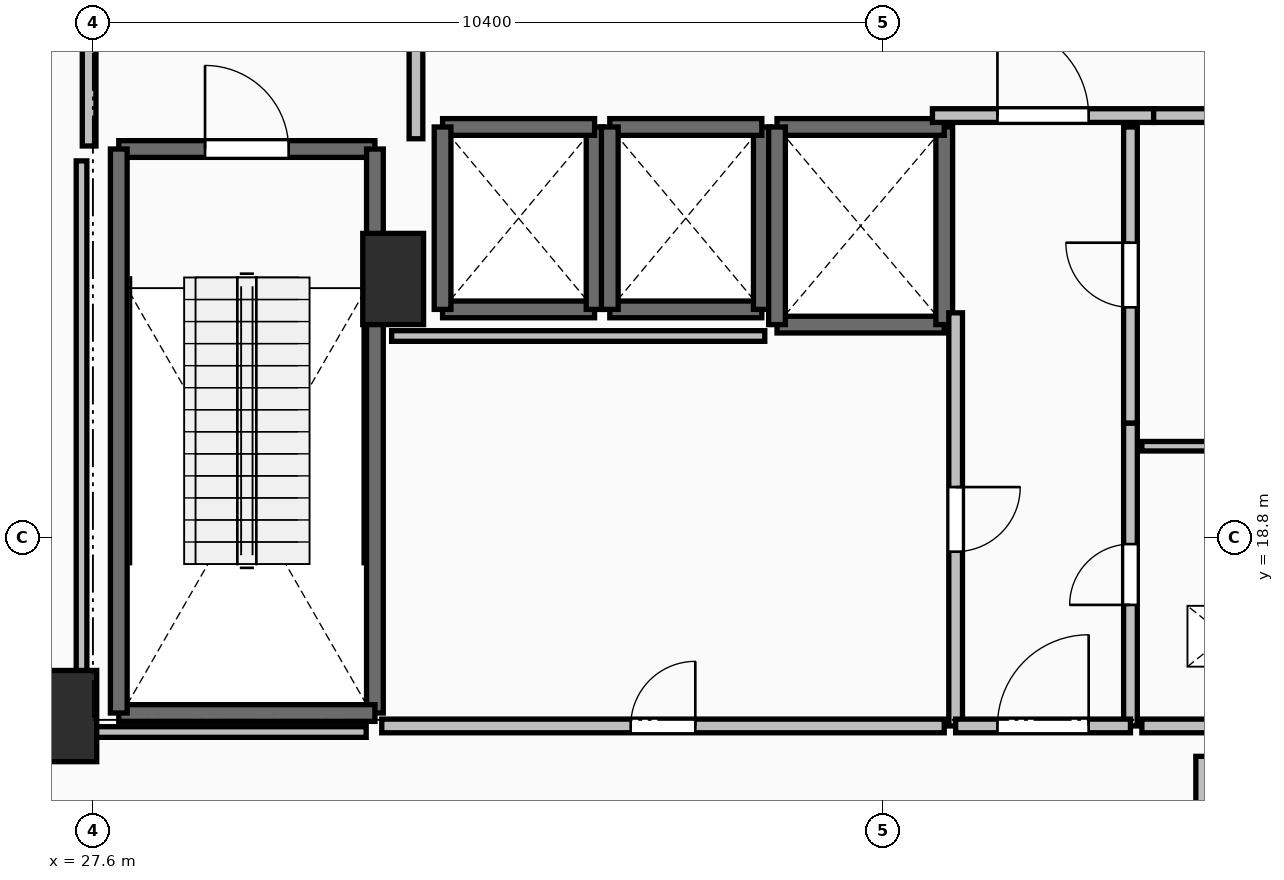
"""IFC4 building model, lengths in metres.
Left out: names, types, materials, properties, quantities, classifications, styles, units other than length and angle.
Written with IfcOpenShell. Run it as: python <this file> out.ifc"""

import sys

from ifc_helpers import new_model, si_unit, direction, frame, frame_2d, origin, origin_2d, place, context, subcontext, project, spatial, rectangle, extrude, element, fill, save


model = new_model("IFC4")
c1 = context("Model", 3, precision=1e-05, world=origin(), true_north=direction((0.0, 1.0)))
c2 = subcontext(c1, "Body", "Model", "MODEL_VIEW")
j1 = project(units=[si_unit("LENGTHUNIT", "METRE"), si_unit("PLANEANGLEUNIT", "RADIAN")], contexts=[c1])
p1 = place(None, origin())
s1 = spatial("IfcSite", under=j1, at=p1, CompositionType="ELEMENT")
p2 = place(p1, origin())
s2 = spatial("IfcBuilding", under=s1, at=p2, CompositionType="ELEMENT")
p3 = place(p2, frame((0.0, 0.0, 4.8)))
s3 = spatial("IfcBuildingStorey", under=s2, at=p3, CompositionType="ELEMENT", Elevation=4.8)
for number, where, z_axis, x_axis in (
    (1, (27.25, 16.45, 0.0), (0.0, 0.0, 1.0), (1.0, 0.0, 0.0)),
    (2, (31.55, 22.2, 0.0), (0.0, 0.0, 1.0), (1.0, 0.0, 0.0)),
):
    element("IfcColumn", number, at=place(p3, frame(where, z_axis=z_axis, x_axis=x_axis)), inside=s3, PredefinedType="PILASTER", context=c2, shape_type="SweptSolid", body=[
        extrude(rectangle(XDim=0.8, YDim=1.2, at=origin_2d()), origin(), (0.0, 0.0, 1.0), 4.8),
    ])
p4 = place(p3, frame((27.94, 23.91, 0.0), z_axis=(0.0, 0.0, 1.0), x_axis=(1.0, 0.0, 0.0)))
e3 = element("IfcWall", 3, at=p4, inside=s3, PredefinedType="SOLIDWALL", context=c2, shape_type="SweptSolid", body=[
    extrude(rectangle(XDim=3.37, YDim=0.22, at=frame_2d((1.685, 0.0))), origin(), (0.0, 0.0, 1.0), 4.48),
])
p5 = place(p4, frame((1.135, 0.0, 0.0)))
e4 = element("IfcOpeningElement", 4, at=p5, cuts=e3, PredefinedType="OPENING", context=c2, shape_type="SweptSolid", body=[
    extrude(rectangle(XDim=1.1, YDim=2.15, at=frame_2d((0.55, 1.075))), frame((0.0, 0.125, 0.0), z_axis=(0.0, -1.0, 0.0), x_axis=(1.0, 0.0, 0.0)), (0.0, 0.0, 1.0), 0.25),
])
p6 = place(p3, frame((31.31, 23.91, 0.0), z_axis=(0.0, 0.0, 1.0), x_axis=(0.0, -1.0, 0.0)))
e5 = element("IfcWall", 5, at=p6, inside=s3, PredefinedType="SOLIDWALL", context=c2, shape_type="SweptSolid", body=[
    extrude(rectangle(XDim=7.42, YDim=0.22, at=frame_2d((3.71, 0.0))), origin(), (0.0, 0.0, 1.0), 4.48),
])
p7 = place(p3, frame((31.31, 16.49, 0.0), z_axis=(0.0, 0.0, 1.0), x_axis=(-1.0, 0.0, 0.0)))
e6 = element("IfcWall", 6, at=p7, inside=s3, PredefinedType="SOLIDWALL", context=c2, shape_type="SweptSolid", body=[
    extrude(rectangle(XDim=3.37, YDim=0.22, at=frame_2d((1.685, 0.0))), origin(), (0.0, 0.0, 1.0), 4.48),
])
p8 = place(p3, frame((27.94, 16.49, 0.0), z_axis=(0.0, 0.0, 1.0), x_axis=(0.0, 1.0, 0.0)))
e7 = element("IfcWall", 7, at=p8, inside=s3, PredefinedType="SOLIDWALL", context=c2, shape_type="SweptSolid", body=[
    extrude(rectangle(XDim=7.42, YDim=0.22, at=frame_2d((3.71, 0.0))), origin(), (0.0, 0.0, 1.0), 4.48),
])
p9 = place(p3, frame((32.2, 21.8, 0.0), z_axis=(0.0, 0.0, 1.0), x_axis=(1.0, 0.0, 0.0)))
e8 = element("IfcWall", 8, at=p9, inside=s3, PredefinedType="SOLIDWALL", context=c2, shape_type="SweptSolid", body=[
    extrude(rectangle(XDim=2.0, YDim=0.22, at=frame_2d((1.0, 0.0))), origin(), (0.0, 0.0, 1.0), 4.48),
])
p10 = place(p3, frame((34.2, 21.8, 0.0), z_axis=(0.0, 0.0, 1.0), x_axis=(0.0, 1.0, 0.0)))
e9 = element("IfcWall", 9, at=p10, inside=s3, PredefinedType="SOLIDWALL", context=c2, shape_type="SweptSolid", body=[
    extrude(rectangle(XDim=2.4, YDim=0.22, at=frame_2d((1.2, 0.0))), origin(), (0.0, 0.0, 1.0), 4.48),
])
p11 = place(p3, frame((34.2, 24.2, 0.0), z_axis=(0.0, 0.0, 1.0), x_axis=(-1.0, 0.0, 0.0)))
e10 = element("IfcWall", 10, at=p11, inside=s3, PredefinedType="SOLIDWALL", context=c2, shape_type="SweptSolid", body=[
    extrude(rectangle(XDim=2.0, YDim=0.22, at=frame_2d((1.0, 0.0))), origin(), (0.0, 0.0, 1.0), 4.48),
])
p12 = place(p3, frame((32.2, 24.2, 0.0), z_axis=(0.0, 0.0, 1.0), x_axis=(0.0, -1.0, 0.0)))
e11 = element("IfcWall", 11, at=p12, inside=s3, PredefinedType="SOLIDWALL", context=c2, shape_type="SweptSolid", body=[
    extrude(rectangle(XDim=2.4, YDim=0.22, at=frame_2d((1.2, 0.0))), origin(), (0.0, 0.0, 1.0), 4.48),
])
p13 = place(p3, frame((34.4, 21.8, 0.0), z_axis=(0.0, 0.0, 1.0), x_axis=(1.0, 0.0, 0.0)))
e12 = element("IfcWall", 12, at=p13, inside=s3, PredefinedType="SOLIDWALL", context=c2, shape_type="SweptSolid", body=[
    extrude(rectangle(XDim=2.0, YDim=0.22, at=frame_2d((1.0, 0.0))), origin(), (0.0, 0.0, 1.0), 4.48),
])
p14 = place(p3, frame((36.4, 21.8, 0.0), z_axis=(0.0, 0.0, 1.0), x_axis=(0.0, 1.0, 0.0)))
e13 = element("IfcWall", 13, at=p14, inside=s3, PredefinedType="SOLIDWALL", context=c2, shape_type="SweptSolid", body=[
    extrude(rectangle(XDim=2.4, YDim=0.22, at=frame_2d((1.2, 0.0))), origin(), (0.0, 0.0, 1.0), 4.48),
])
p15 = place(p3, frame((36.4, 24.2, 0.0), z_axis=(0.0, 0.0, 1.0), x_axis=(-1.0, 0.0, 0.0)))
e14 = element("IfcWall", 14, at=p15, inside=s3, PredefinedType="SOLIDWALL", context=c2, shape_type="SweptSolid", body=[
    extrude(rectangle(XDim=2.0, YDim=0.22, at=frame_2d((1.0, 0.0))), origin(), (0.0, 0.0, 1.0), 4.48),
])
p16 = place(p3, frame((34.4, 24.2, 0.0), z_axis=(0.0, 0.0, 1.0), x_axis=(0.0, -1.0, 0.0)))
e15 = element("IfcWall", 15, at=p16, inside=s3, PredefinedType="SOLIDWALL", context=c2, shape_type="SweptSolid", body=[
    extrude(rectangle(XDim=2.4, YDim=0.22, at=frame_2d((1.2, 0.0))), origin(), (0.0, 0.0, 1.0), 4.48),
])
p17 = place(p3, frame((36.6, 21.6, 0.0), z_axis=(0.0, 0.0, 1.0), x_axis=(1.0, 0.0, 0.0)))
e16 = element("IfcWall", 16, at=p17, inside=s3, PredefinedType="SOLIDWALL", context=c2, shape_type="SweptSolid", body=[
    extrude(rectangle(XDim=2.2, YDim=0.22, at=frame_2d((1.1, 0.0))), origin(), (0.0, 0.0, 1.0), 4.48),
])
p18 = place(p3, frame((38.8, 21.6, 0.0), z_axis=(0.0, 0.0, 1.0), x_axis=(0.0, 1.0, 0.0)))
e17 = element("IfcWall", 17, at=p18, inside=s3, PredefinedType="SOLIDWALL", context=c2, shape_type="SweptSolid", body=[
    extrude(rectangle(XDim=2.6, YDim=0.22, at=frame_2d((1.3, 0.0))), origin(), (0.0, 0.0, 1.0), 4.48),
])
p19 = place(p3, frame((38.8, 24.2, 0.0), z_axis=(0.0, 0.0, 1.0), x_axis=(-1.0, 0.0, 0.0)))
e18 = element("IfcWall", 18, at=p19, inside=s3, PredefinedType="SOLIDWALL", context=c2, shape_type="SweptSolid", body=[
    extrude(rectangle(XDim=2.2, YDim=0.22, at=frame_2d((1.1, 0.0))), origin(), (0.0, 0.0, 1.0), 4.48),
])
p20 = place(p3, frame((36.6, 24.2, 0.0), z_axis=(0.0, 0.0, 1.0), x_axis=(0.0, -1.0, 0.0)))
e19 = element("IfcWall", 19, at=p20, inside=s3, PredefinedType="SOLIDWALL", context=c2, shape_type="SweptSolid", body=[
    extrude(rectangle(XDim=2.6, YDim=0.22, at=frame_2d((1.3, 0.0))), origin(), (0.0, 0.0, 1.0), 4.48),
])
p21 = place(p3, frame((31.85, 24.045, 0.0), z_axis=(0.0, 0.0, 1.0), x_axis=(0.0, 1.0, 0.0)))
e20 = element("IfcWall", 20, at=p21, inside=s3, PredefinedType="PARTITIONING", context=c2, shape_type="SweptSolid", body=[
    extrude(rectangle(XDim=3.91, YDim=0.18, at=frame_2d((1.955, 0.0))), origin(), (0.0, 0.0, 1.0), 4.48),
])
p22 = place(p21, frame((1.355, 0.0, 0.0)))
e21 = element("IfcOpeningElement", 21, at=p22, cuts=e20, PredefinedType="OPENING", context=c2, shape_type="SweptSolid", body=[
    extrude(rectangle(XDim=1.2, YDim=2.15, at=frame_2d((0.6, 1.075))), frame((0.0, 0.105, 0.0), z_axis=(0.0, -1.0, 0.0), x_axis=(1.0, 0.0, 0.0)), (0.0, 0.0, 1.0), 0.21),
])
p23 = place(p3, frame((27.55, 28.0, 0.0), z_axis=(0.0, 0.0, 1.0), x_axis=(0.0, -1.0, 0.0)))
e22 = element("IfcWall", 22, at=p23, inside=s3, PredefinedType="PARTITIONING", context=c2, shape_type="SweptSolid", body=[
    extrude(rectangle(XDim=4.05, YDim=0.18, at=frame_2d((2.025, 0.0))), origin(), (0.0, 0.0, 1.0), 4.48),
])
p24 = place(p23, frame((1.425, 0.0, 0.0)))
e23 = element("IfcOpeningElement", 23, at=p24, cuts=e22, PredefinedType="OPENING", context=c2, shape_type="SweptSolid", body=[
    extrude(rectangle(XDim=1.2, YDim=2.15, at=frame_2d((0.6, 1.075))), frame((0.0, 0.105, 0.0), z_axis=(0.0, -1.0, 0.0), x_axis=(1.0, 0.0, 0.0)), (0.0, 0.0, 1.0), 0.21),
])
p25 = place(p3, frame((38.645, 24.35, 0.0), z_axis=(0.0, 0.0, 1.0), x_axis=(1.0, 0.0, 0.0)))
e24 = element("IfcWall", 24, at=p25, inside=s3, PredefinedType="PARTITIONING", context=c2, shape_type="SweptSolid", body=[
    extrude(rectangle(XDim=2.91, YDim=0.18, at=frame_2d((1.455, 0.0))), origin(), (0.0, 0.0, 1.0), 4.48),
])
p26 = place(p25, frame((0.855, 0.0, 0.0)))
e25 = element("IfcOpeningElement", 25, at=p26, cuts=e24, PredefinedType="OPENING", context=c2, shape_type="SweptSolid", body=[
    extrude(rectangle(XDim=1.2, YDim=2.15, at=frame_2d((0.6, 1.075))), frame((0.0, 0.105, 0.0), z_axis=(0.0, -1.0, 0.0), x_axis=(1.0, 0.0, 0.0)), (0.0, 0.0, 1.0), 0.21),
])
p27 = place(p3, frame((41.555, 24.35, 0.0), z_axis=(0.0, 0.0, 1.0), x_axis=(1.0, 0.0, 0.0)))
e26 = element("IfcWall", 26, at=p27, inside=s3, PredefinedType="PARTITIONING", context=c2, shape_type="SweptSolid", body=[
    extrude(rectangle(XDim=2.445, YDim=0.18, at=frame_2d((1.223, 0.0))), origin(), (0.0, 0.0, 1.0), 4.48),
])
p28 = place(p27, frame((0.798, 0.0, 0.0)))
e27 = element("IfcOpeningElement", 27, at=p28, cuts=e26, PredefinedType="OPENING", context=c2, shape_type="SweptSolid", body=[
    extrude(rectangle(XDim=0.85, YDim=2.1, at=frame_2d((0.425, 1.05))), frame((0.0, 0.105, 0.0), z_axis=(0.0, -1.0, 0.0), x_axis=(1.0, 0.0, 0.0)), (0.0, 0.0, 1.0), 0.21),
])
p29 = place(p3, frame((41.25, 16.32, 0.0), z_axis=(0.0, 0.0, 1.0), x_axis=(0.0, 1.0, 0.0)))
e28 = element("IfcWall", 28, at=p29, inside=s3, PredefinedType="PARTITIONING", context=c2, shape_type="SweptSolid", body=[
    extrude(rectangle(XDim=3.985, YDim=0.18, at=frame_2d((1.992, 0.0))), origin(), (0.0, 0.0, 1.0), 4.48),
])
p30 = place(p29, frame((1.593, 0.0, 0.0)))
e29 = element("IfcOpeningElement", 29, at=p30, cuts=e28, PredefinedType="OPENING", context=c2, shape_type="SweptSolid", body=[
    extrude(rectangle(XDim=0.8, YDim=2.05, at=frame_2d((0.4, 1.025))), frame((0.0, 0.105, 0.0), z_axis=(0.0, -1.0, 0.0), x_axis=(1.0, 0.0, 0.0)), (0.0, 0.0, 1.0), 0.21),
])
p31 = place(p3, frame((41.25, 20.305, 0.0), z_axis=(0.0, 0.0, 1.0), x_axis=(0.0, 1.0, 0.0)))
e30 = element("IfcWall", 30, at=p31, inside=s3, PredefinedType="PARTITIONING", context=c2, shape_type="SweptSolid", body=[
    extrude(rectangle(XDim=3.895, YDim=0.18, at=frame_2d((1.948, 0.0))), origin(), (0.0, 0.0, 1.0), 4.48),
])
p32 = place(p31, frame((1.522, 0.0, 0.0)))
e31 = element("IfcOpeningElement", 31, at=p32, cuts=e30, PredefinedType="OPENING", context=c2, shape_type="SweptSolid", body=[
    extrude(rectangle(XDim=0.85, YDim=2.1, at=frame_2d((0.425, 1.05))), frame((0.0, 0.105, 0.0), z_axis=(0.0, -1.0, 0.0), x_axis=(1.0, 0.0, 0.0)), (0.0, 0.0, 1.0), 0.21),
])
p33 = place(p3, frame((38.95, 21.755, 0.0), z_axis=(0.0, 0.0, 1.0), x_axis=(0.0, -1.0, 0.0)))
e32 = element("IfcWall", 32, at=p33, inside=s3, PredefinedType="PARTITIONING", context=c2, shape_type="SweptSolid", body=[
    extrude(rectangle(XDim=5.435, YDim=0.18, at=frame_2d((2.717, 0.0))), origin(), (0.0, 0.0, 1.0), 4.48),
])
p34 = place(p33, frame((2.292, 0.0, 0.0)))
e33 = element("IfcOpeningElement", 33, at=p34, cuts=e32, PredefinedType="OPENING", context=c2, shape_type="SweptSolid", body=[
    extrude(rectangle(XDim=0.85, YDim=2.1, at=frame_2d((0.425, 1.05))), frame((0.0, 0.105, 0.0), z_axis=(0.0, -1.0, 0.0), x_axis=(1.0, 0.0, 0.0)), (0.0, 0.0, 1.0), 0.21),
])
p35 = place(p3, frame((38.95, 16.32, 0.0), z_axis=(0.0, 0.0, 1.0), x_axis=(1.0, 0.0, 0.0)))
e34 = element("IfcWall", 34, at=p35, inside=s3, PredefinedType="PARTITIONING", context=c2, shape_type="SweptSolid", body=[
    extrude(rectangle(XDim=2.3, YDim=0.18, at=frame_2d((1.15, 0.0))), origin(), (0.0, 0.0, 1.0), 4.48),
])
p36 = place(p35, frame((0.55, 0.0, 0.0)))
e35 = element("IfcOpeningElement", 35, at=p36, cuts=e34, PredefinedType="OPENING", context=c2, shape_type="SweptSolid", body=[
    extrude(rectangle(XDim=1.2, YDim=2.15, at=frame_2d((0.6, 1.075))), frame((0.0, 0.105, 0.0), z_axis=(0.0, -1.0, 0.0), x_axis=(1.0, 0.0, 0.0)), (0.0, 0.0, 1.0), 0.21),
])
p37 = place(p3, frame((44.6, 20.0, 0.0), z_axis=(0.0, 0.0, 1.0), x_axis=(-1.0, 0.0, 0.0)))
e36 = element("IfcWall", 36, at=p37, inside=s3, PredefinedType="PARTITIONING", context=c2, shape_type="SweptSolid", body=[
    extrude(rectangle(XDim=3.2, YDim=0.125, at=frame_2d((1.6, 0.0))), origin(), (0.0, 0.0, 1.0), 4.48),
])
p38 = place(p3, frame((41.4, 16.32, 0.0), z_axis=(0.0, 0.0, 1.0), x_axis=(1.0, 0.0, 0.0)))
e37 = element("IfcWall", 37, at=p38, inside=s3, PredefinedType="PARTITIONING", context=c2, shape_type="SweptSolid", body=[
    extrude(rectangle(XDim=3.2, YDim=0.18, at=frame_2d((1.6, 0.0))), origin(), (0.0, 0.0, 1.0), 4.48),
])
p39 = place(p38, frame((1.2, 0.0, 0.0)))
e38 = element("IfcOpeningElement", 38, at=p39, cuts=e37, PredefinedType="OPENING", context=c2, shape_type="SweptSolid", body=[
    extrude(rectangle(XDim=0.8, YDim=2.05, at=frame_2d((0.4, 1.025))), frame((0.0, 0.105, 0.0), z_axis=(0.0, -1.0, 0.0), x_axis=(1.0, 0.0, 0.0)), (0.0, 0.0, 1.0), 0.21),
])
p40 = place(p3, frame((31.4, 16.32, 0.0), z_axis=(0.0, 0.0, 1.0), x_axis=(1.0, 0.0, 0.0)))
e39 = element("IfcWall", 39, at=p40, inside=s3, PredefinedType="PARTITIONING", context=c2, shape_type="SweptSolid", body=[
    extrude(rectangle(XDim=7.4, YDim=0.18, at=frame_2d((3.7, 0.0))), origin(), (0.0, 0.0, 1.0), 4.48),
])
p41 = place(p40, frame((3.275, 0.0, 0.0)))
e40 = element("IfcOpeningElement", 40, at=p41, cuts=e39, PredefinedType="OPENING", context=c2, shape_type="SweptSolid", body=[
    extrude(rectangle(XDim=0.85, YDim=2.1, at=frame_2d((0.425, 1.05))), frame((0.0, 0.105, 0.0), z_axis=(0.0, -1.0, 0.0), x_axis=(1.0, 0.0, 0.0)), (0.0, 0.0, 1.0), 0.21),
])
p42 = place(p3, frame((42.2, 14.1, 0.0), z_axis=(0.0, 0.0, 1.0), x_axis=(0.0, 1.0, 0.0)))
e41 = element("IfcWall", 41, at=p42, inside=s3, PredefinedType="PARTITIONING", context=c2, shape_type="SweptSolid", body=[
    extrude(rectangle(XDim=1.82, YDim=0.18, at=frame_2d((0.91, 0.0))), origin(), (0.0, 0.0, 1.0), 4.48),
])
p43 = place(p3, frame((36.439, 21.45, 0.0), z_axis=(0.0, 0.0, 1.0), x_axis=(-1.0, 0.0, 0.0)))
e42 = element("IfcWall", 42, at=p43, inside=s3, PredefinedType="PARTITIONING", context=c2, shape_type="SweptSolid", body=[
    extrude(rectangle(XDim=4.909, YDim=0.14, at=frame_2d((2.455, 0.0))), origin(), (0.0, 0.0, 1.0), 4.48),
])
p44 = place(p3, frame((31.195, 16.24, 0.0), z_axis=(0.0, 0.0, 1.0), x_axis=(-1.0, 0.0, 0.0)))
e43 = element("IfcWall", 43, at=p44, inside=s3, PredefinedType="PARTITIONING", context=c2, shape_type="SweptSolid", body=[
    extrude(rectangle(XDim=3.745, YDim=0.14, at=frame_2d((1.873, 0.0))), origin(), (0.0, 0.0, 1.0), 3.672),
])
p45 = place(p3, frame((27.45, 16.24, 0.0), z_axis=(0.0, 0.0, 1.0), x_axis=(0.0, 1.0, 0.0)))
e44 = element("IfcWall", 44, at=p45, inside=s3, PredefinedType="PARTITIONING", context=c2, shape_type="SweptSolid", body=[
    extrude(rectangle(XDim=7.514, YDim=0.14, at=frame_2d((3.757, 0.0))), origin(), (0.0, 0.0, 1.0), 2.406),
])
p46 = place(p5, origin())
e45 = element("IfcDoor", 45, at=p46, inside=s3, OperationType="SINGLE_SWING_LEFT", PredefinedType="DOOR", context=c2, shape_type="SweptSolid", body=[
    extrude(rectangle(XDim=1.1, YDim=2.15, at=frame_2d((0.55, 1.075))), frame((0.0, 0.025, 0.0), z_axis=(0.0, -1.0, 0.0), x_axis=(1.0, 0.0, 0.0)), (0.0, 0.0, 1.0), 0.05),
])
fill(e4, e45)
p47 = place(p26, origin())
e46 = element("IfcDoor", 46, at=p47, inside=s3, OperationType="SINGLE_SWING_LEFT", PredefinedType="DOOR", context=c2, shape_type="SweptSolid", body=[
    extrude(rectangle(XDim=1.2, YDim=2.15, at=frame_2d((0.6, 1.075))), frame((0.0, 0.025, 0.0), z_axis=(0.0, -1.0, 0.0), x_axis=(1.0, 0.0, 0.0)), (0.0, 0.0, 1.0), 0.05),
])
fill(e25, e46)
p48 = place(p30, origin())
e47 = element("IfcDoor", 47, at=p48, inside=s3, OperationType="SINGLE_SWING_LEFT", PredefinedType="DOOR", context=c2, shape_type="SweptSolid", body=[
    extrude(rectangle(XDim=0.8, YDim=2.05, at=frame_2d((0.4, 1.025))), frame((0.0, 0.025, 0.0), z_axis=(0.0, -1.0, 0.0), x_axis=(1.0, 0.0, 0.0)), (0.0, 0.0, 1.0), 0.05),
])
fill(e29, e47)
p49 = place(p32, origin())
e48 = element("IfcDoor", 48, at=p49, inside=s3, OperationType="SINGLE_SWING_RIGHT", PredefinedType="DOOR", context=c2, shape_type="SweptSolid", body=[
    extrude(rectangle(XDim=0.85, YDim=2.1, at=frame_2d((0.425, 1.05))), frame((0.0, 0.025, 0.0), z_axis=(0.0, -1.0, 0.0), x_axis=(1.0, 0.0, 0.0)), (0.0, 0.0, 1.0), 0.05),
])
fill(e31, e48)
p50 = place(p34, origin())
e49 = element("IfcDoor", 49, at=p50, inside=s3, OperationType="SINGLE_SWING_LEFT", PredefinedType="DOOR", context=c2, shape_type="SweptSolid", body=[
    extrude(rectangle(XDim=0.85, YDim=2.1, at=frame_2d((0.425, 1.05))), frame((0.0, 0.025, 0.0), z_axis=(0.0, -1.0, 0.0), x_axis=(1.0, 0.0, 0.0)), (0.0, 0.0, 1.0), 0.05),
])
fill(e33, e49)
p51 = place(p36, origin())
e50 = element("IfcDoor", 50, at=p51, inside=s3, OperationType="SINGLE_SWING_RIGHT", PredefinedType="DOOR", context=c2, shape_type="SweptSolid", body=[
    extrude(rectangle(XDim=1.2, YDim=2.15, at=frame_2d((0.6, 1.075))), frame((0.0, 0.025, 0.0), z_axis=(0.0, -1.0, 0.0), x_axis=(1.0, 0.0, 0.0)), (0.0, 0.0, 1.0), 0.05),
])
fill(e35, e50)
p52 = place(p41, origin())
e51 = element("IfcDoor", 51, at=p52, inside=s3, OperationType="SINGLE_SWING_RIGHT", PredefinedType="DOOR", context=c2, shape_type="SweptSolid", body=[
    extrude(rectangle(XDim=0.85, YDim=2.1, at=frame_2d((0.425, 1.05))), frame((0.0, 0.025, 0.0), z_axis=(0.0, -1.0, 0.0), x_axis=(1.0, 0.0, 0.0)), (0.0, 0.0, 1.0), 0.05),
])
fill(e40, e51)
save(model, sys.argv[1])
